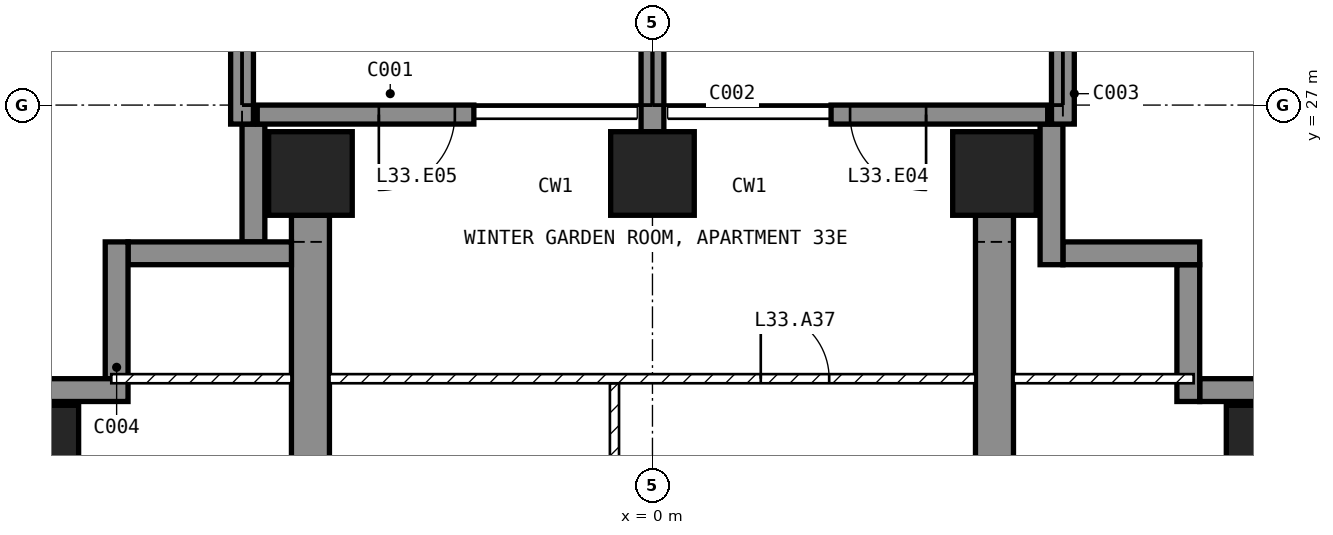
"""IFC4 building model, lengths in metres.
Left out: names, types, materials, properties, quantities, classifications, styles, units other than length and angle.
Written with IfcOpenShell. Run it as: python <this file> out.ifc"""

import sys

from ifc_helpers import new_model, si_unit, direction, frame, frame_2d, origin, origin_2d, place, context, subcontext, project, spatial, polyline, rectangle, outline, extrude, element, fill, save


model = new_model("IFC4")
c1 = context("Model", 3, precision=1e-05, world=origin(), true_north=direction((0.0, 1.0)))
c2 = subcontext(c1, "Body", "Model", "MODEL_VIEW")
j1 = project(units=[si_unit("LENGTHUNIT", "METRE"), si_unit("PLANEANGLEUNIT", "RADIAN")], contexts=[c1])
p1 = place(None, origin())
s1 = spatial("IfcSite", under=j1, at=p1, CompositionType="ELEMENT")
p2 = place(p1, origin())
s2 = spatial("IfcBuilding", under=s1, at=p2, CompositionType="ELEMENT")
p3 = place(p2, frame((0.0, 0.0, 137.4)))
s3 = spatial("IfcBuildingStorey", under=s2, at=p3, CompositionType="ELEMENT", Elevation=137.4)
for number, where, z_axis, x_axis in (
    (1, (-8.1, 22.5, -0.25), (0.0, 0.0, 1.0), (1.0, 0.0, 0.0)),
    (2, (-4.5, 26.1, -0.25), (0.0, 0.0, 1.0), (1.0, 0.0, 0.0)),
    (3, (0.0, 26.1, -0.25), (0.0, 0.0, 1.0), (1.0, 0.0, 0.0)),
    (4, (4.5, 26.1, -0.25), (0.0, 0.0, 1.0), (1.0, 0.0, 0.0)),
    (5, (8.1, 22.5, -0.25), (0.0, 0.0, 1.0), (1.0, 0.0, 0.0)),
):
    element("IfcColumn", number, at=place(p3, frame(where, z_axis=z_axis, x_axis=x_axis)), inside=s3, PredefinedType="COLUMN", context=c2, shape_type="SweptSolid", body=[
        extrude(rectangle(XDim=1.1, YDim=1.1, at=origin_2d()), origin(), (0.0, 0.0, 1.0), 3.5),
    ])
for number, where, z_axis, x_axis in (
    (6, (-4.75, 9.0, -0.25), (1.0, 0.0, 0.0), (0.0, 1.0, 0.0)),
    (7, (4.25, 9.0, -0.25), (1.0, 0.0, 0.0), (0.0, 1.0, 0.0)),
):
    element("IfcWall", number, at=place(p3, frame(where, z_axis=z_axis, x_axis=x_axis)), inside=s3, PredefinedType="SHEAR", context=c2, shape_type="SweptSolid", body=[
        extrude(outline(polyline([(0.0, 0.0), (2.1, 0.0), (2.1, 2.65), (4.5, 2.65), (4.5, 0.0), (9.9, 0.0), (9.9, 2.65), (12.3, 2.65), (12.3, 0.0), (16.55, 0.0), (16.55, 3.5), (0.0, 3.5), (0.0, 0.0)])), origin(), (0.0, 0.0, 1.0), 0.5),
    ])
p4 = place(p3, frame((5.2, 26.875, 0.0), z_axis=(0.0, 0.0, 1.0), x_axis=(-1.0, 0.0, 0.0)))
e8 = element("IfcWall", 8, at=p4, inside=s3, PredefinedType="SOLIDWALL", context=c2, shape_type="SweptSolid", body=[
    extrude(rectangle(XDim=2.85, YDim=0.25, at=frame_2d((1.425, 0.0))), origin(), (0.0, 0.0, 1.0), 3.25),
])
p5 = place(p4, frame((1.6, 0.0, 0.0)))
e9 = element("IfcOpeningElement", 9, at=p5, cuts=e8, PredefinedType="OPENING", context=c2, shape_type="SweptSolid", body=[
    extrude(rectangle(XDim=1.0, YDim=2.4, at=frame_2d((0.5, 1.2))), frame((0.0, 0.135, 0.0), z_axis=(0.0, -1.0, 0.0), x_axis=(1.0, 0.0, 0.0)), (0.0, 0.0, 1.0), 0.27),
])
p6 = place(p3, frame((-2.35, 26.875, 0.0), z_axis=(0.0, 0.0, 1.0), x_axis=(-1.0, 0.0, 0.0)))
e10 = element("IfcWall", 10, at=p6, inside=s3, PredefinedType="SOLIDWALL", context=c2, shape_type="SweptSolid", body=[
    extrude(rectangle(XDim=2.85, YDim=0.25, at=frame_2d((1.425, 0.0))), origin(), (0.0, 0.0, 1.0), 3.25),
])
p7 = place(p6, frame((0.25, 0.0, 0.0)))
e11 = element("IfcOpeningElement", 11, at=p7, cuts=e10, PredefinedType="OPENING", context=c2, shape_type="SweptSolid", body=[
    extrude(rectangle(XDim=1.0, YDim=2.4, at=frame_2d((0.5, 1.2))), frame((0.0, 0.135, 0.0), z_axis=(0.0, -1.0, 0.0), x_axis=(1.0, 0.0, 0.0)), (0.0, 0.0, 1.0), 0.27),
])
p8 = place(p3, frame((8.75, 23.25, 0.0), z_axis=(0.0, 0.0, 1.0), x_axis=(-1.0, 0.0, 0.0)))
e12 = element("IfcWall", 12, at=p8, inside=s3, PredefinedType="SOLIDWALL", context=c2, shape_type="SweptSolid", body=[
    extrude(rectangle(XDim=1.55, YDim=0.3, at=frame_2d((0.775, 0.0))), origin(), (0.0, 0.0, 1.0), 3.25),
])
p9 = place(p3, frame((7.05, 23.1, 0.0), z_axis=(0.0, 0.0, 1.0), x_axis=(0.0, 1.0, 0.0)))
e13 = element("IfcWall", 13, at=p9, inside=s3, PredefinedType="SOLIDWALL", context=c2, shape_type="SweptSolid", body=[
    extrude(rectangle(XDim=1.8, YDim=0.3, at=frame_2d((0.9, 0.0))), origin(), (0.0, 0.0, 1.0), 3.25),
])
p10 = place(p3, frame((7.2, 25.05, 0.0), z_axis=(0.0, 0.0, 1.0), x_axis=(-1.0, 0.0, 0.0)))
e14 = element("IfcWall", 14, at=p10, inside=s3, PredefinedType="SOLIDWALL", context=c2, shape_type="SweptSolid", body=[
    extrude(rectangle(XDim=1.8, YDim=0.3, at=frame_2d((0.9, 0.0))), origin(), (0.0, 0.0, 1.0), 3.25),
])
p11 = place(p3, frame((5.25, 24.9, 0.0), z_axis=(0.0, 0.0, 1.0), x_axis=(0.0, 1.0, 0.0)))
e15 = element("IfcWall", 15, at=p11, inside=s3, PredefinedType="SOLIDWALL", context=c2, shape_type="SweptSolid", body=[
    extrude(rectangle(XDim=1.85, YDim=0.3, at=frame_2d((0.925, 0.0))), origin(), (0.0, 0.0, 1.0), 3.25),
])
p12 = place(p3, frame((-5.25, 26.75, 0.0), z_axis=(0.0, 0.0, 1.0), x_axis=(0.0, -1.0, 0.0)))
e16 = element("IfcWall", 16, at=p12, inside=s3, PredefinedType="SOLIDWALL", context=c2, shape_type="SweptSolid", body=[
    extrude(rectangle(XDim=1.55, YDim=0.3, at=frame_2d((0.775, 0.0))), origin(), (0.0, 0.0, 1.0), 3.25),
])
p13 = place(p3, frame((-4.75, 25.05, 0.0), z_axis=(0.0, 0.0, 1.0), x_axis=(-1.0, 0.0, 0.0)))
e17 = element("IfcWall", 17, at=p13, inside=s3, PredefinedType="SOLIDWALL", context=c2, shape_type="SweptSolid", body=[
    extrude(rectangle(XDim=2.15, YDim=0.3, at=frame_2d((1.075, 0.0))), origin(), (0.0, 0.0, 1.0), 3.25),
])
p14 = place(p3, frame((-7.05, 25.2, 0.0), z_axis=(0.0, 0.0, 1.0), x_axis=(0.0, -1.0, 0.0)))
e18 = element("IfcWall", 18, at=p14, inside=s3, PredefinedType="SOLIDWALL", context=c2, shape_type="SweptSolid", body=[
    extrude(rectangle(XDim=1.8, YDim=0.3, at=frame_2d((0.9, 0.0))), origin(), (0.0, 0.0, 1.0), 3.25),
])
p15 = place(p3, frame((-6.9, 23.25, 0.0), z_axis=(0.0, 0.0, 1.0), x_axis=(-1.0, 0.0, 0.0)))
e19 = element("IfcWall", 19, at=p15, inside=s3, PredefinedType="SOLIDWALL", context=c2, shape_type="SweptSolid", body=[
    extrude(rectangle(XDim=1.85, YDim=0.3, at=frame_2d((0.925, 0.0))), origin(), (0.0, 0.0, 1.0), 3.25),
])
p16 = place(p3, frame((-5.4, 26.75, 0.0), z_axis=(0.0, 0.0, 1.0), x_axis=(0.0, 1.0, 0.0)))
e20 = element("IfcWall", 20, at=p16, inside=s3, PredefinedType="SOLIDWALL", context=c2, shape_type="SweptSolid", body=[
    extrude(rectangle(XDim=2.95, YDim=0.3, at=frame_2d((1.475, 0.0))), origin(), (0.0, 0.0, 1.0), 3.25),
])
p17 = place(p3, frame((0.0, 26.65, 0.0), z_axis=(0.0, 0.0, 1.0), x_axis=(0.0, 1.0, 0.0)))
e21 = element("IfcWall", 21, at=p17, inside=s3, PredefinedType="SOLIDWALL", context=c2, shape_type="SweptSolid", body=[
    extrude(rectangle(XDim=3.05, YDim=0.3, at=frame_2d((1.525, 0.0))), origin(), (0.0, 0.0, 1.0), 3.25),
])
p18 = place(p3, frame((5.4, 26.75, 0.0), z_axis=(0.0, 0.0, 1.0), x_axis=(0.0, 1.0, 0.0)))
e22 = element("IfcWall", 22, at=p18, inside=s3, PredefinedType="SOLIDWALL", context=c2, shape_type="SweptSolid", body=[
    extrude(rectangle(XDim=2.95, YDim=0.3, at=frame_2d((1.475, 0.0))), origin(), (0.0, 0.0, 1.0), 3.25),
])
p19 = place(p3, frame((-0.5, 18.96, 0.0), z_axis=(0.0, 0.0, 1.0), x_axis=(0.0, 1.0, 0.0)))
e23 = element("IfcWall", 23, at=p19, inside=s3, PredefinedType="PARTITIONING", context=c2, shape_type="SweptSolid", body=[
    extrude(rectangle(XDim=4.38, YDim=0.12, at=frame_2d((2.19, 0.0))), origin(), (0.0, 0.0, 1.0), 3.25),
])
p20 = place(p19, frame((1.74, 0.0, 0.0)))
e24 = element("IfcOpeningElement", 24, at=p20, cuts=e23, PredefinedType="OPENING", context=c2, shape_type="SweptSolid", body=[
    extrude(rectangle(XDim=0.9, YDim=2.1, at=frame_2d((0.45, 1.05))), frame((0.0, 0.07, 0.0), z_axis=(0.0, -1.0, 0.0), x_axis=(1.0, 0.0, 0.0)), (0.0, 0.0, 1.0), 0.14),
])
p21 = place(p3, frame((-4.25, 23.4, 0.0), z_axis=(0.0, 0.0, 1.0), x_axis=(1.0, 0.0, 0.0)))
e25 = element("IfcWall", 25, at=p21, inside=s3, PredefinedType="PARTITIONING", context=c2, shape_type="SweptSolid", body=[
    extrude(rectangle(XDim=8.5, YDim=0.12, at=frame_2d((4.25, 0.0))), origin(), (0.0, 0.0, 1.0), 3.25),
])
p22 = place(p21, frame((5.675, 0.0, 0.0)))
e26 = element("IfcOpeningElement", 26, at=p22, cuts=e25, PredefinedType="OPENING", context=c2, shape_type="SweptSolid", body=[
    extrude(rectangle(XDim=0.9, YDim=2.1, at=frame_2d((0.45, 1.05))), frame((0.0, 0.07, 0.0), z_axis=(0.0, -1.0, 0.0), x_axis=(1.0, 0.0, 0.0)), (0.0, 0.0, 1.0), 0.14),
])
for number, where, z_axis, x_axis in (
    (27, (4.75, 23.4, 0.0), (0.0, 0.0, 1.0), (1.0, 0.0, 0.0)),
    (28, (-7.12, 23.4, 0.0), (0.0, 0.0, 1.0), (1.0, 0.0, 0.0)),
):
    element("IfcWall", number, at=place(p3, frame(where, z_axis=z_axis, x_axis=x_axis)), inside=s3, PredefinedType="PARTITIONING", context=c2, shape_type="SweptSolid", body=[
        extrude(rectangle(XDim=2.37, YDim=0.12, at=frame_2d((1.185, 0.0))), origin(), (0.0, 0.0, 1.0), 3.25),
    ])
p23 = place(p5, origin())
e29 = element("IfcDoor", 29, at=p23, inside=s3, OperationType="SINGLE_SWING_LEFT", PredefinedType="DOOR", context=c2, shape_type="SweptSolid", body=[
    extrude(rectangle(XDim=1.0, YDim=2.4, at=frame_2d((0.5, 1.2))), frame((0.0, 0.025, 0.0), z_axis=(0.0, -1.0, 0.0), x_axis=(1.0, 0.0, 0.0)), (0.0, 0.0, 1.0), 0.05),
])
fill(e9, e29)
p24 = place(p7, origin())
e30 = element("IfcDoor", 30, at=p24, inside=s3, OperationType="SINGLE_SWING_RIGHT", PredefinedType="DOOR", context=c2, shape_type="SweptSolid", body=[
    extrude(rectangle(XDim=1.0, YDim=2.4, at=frame_2d((0.5, 1.2))), frame((0.0, 0.025, 0.0), z_axis=(0.0, -1.0, 0.0), x_axis=(1.0, 0.0, 0.0)), (0.0, 0.0, 1.0), 0.05),
])
fill(e11, e30)
p25 = place(p22, origin())
e31 = element("IfcDoor", 31, at=p25, inside=s3, OperationType="SINGLE_SWING_LEFT", PredefinedType="DOOR", context=c2, shape_type="SweptSolid", body=[
    extrude(rectangle(XDim=0.9, YDim=2.1, at=frame_2d((0.45, 1.05))), frame((0.0, 0.025, 0.0), z_axis=(0.0, -1.0, 0.0), x_axis=(1.0, 0.0, 0.0)), (0.0, 0.0, 1.0), 0.05),
])
fill(e26, e31)
save(model, sys.argv[1])
